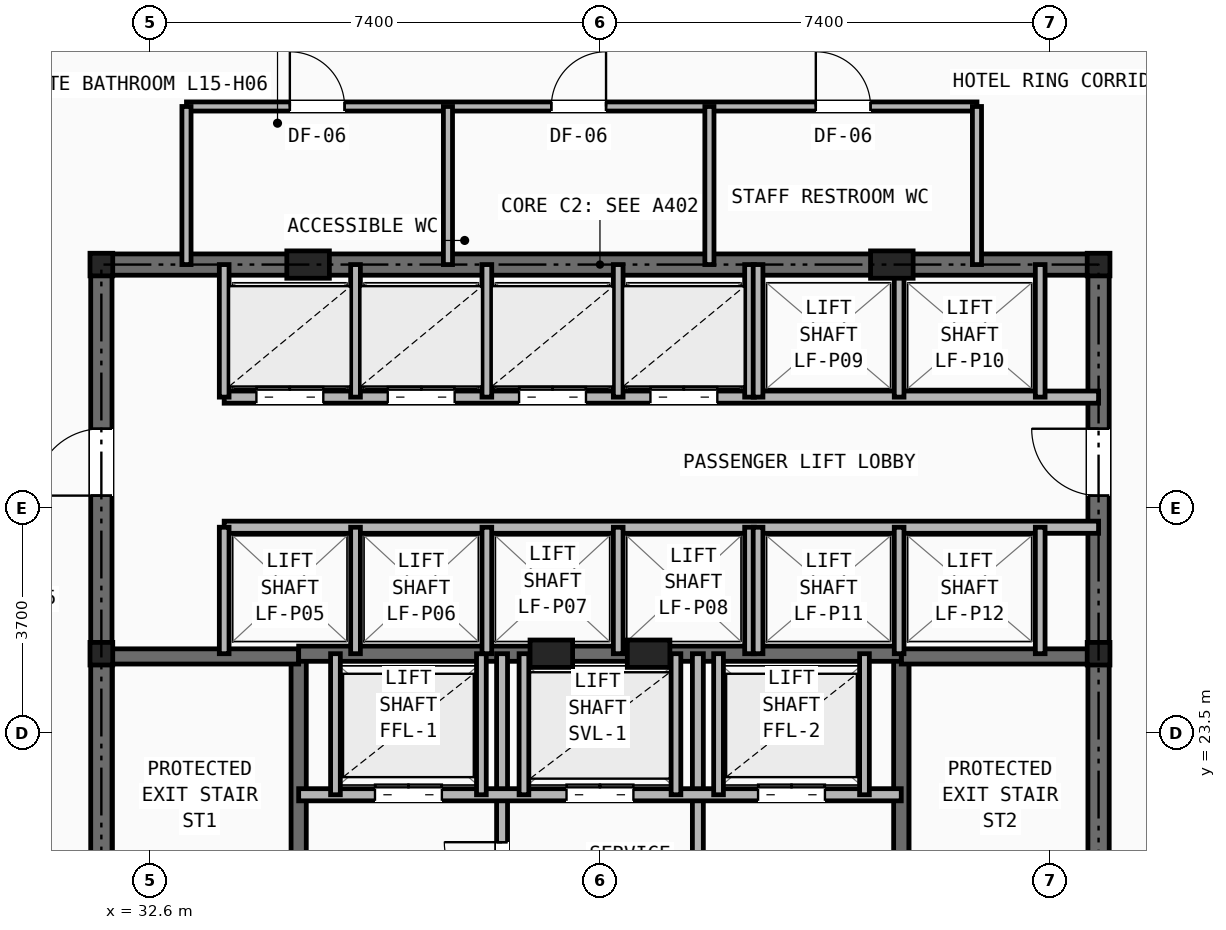
"""IFC4 building model, lengths in metres.
Left out: names, types, materials, properties, quantities, classifications, styles, units other than length and angle.
Written with IfcOpenShell. Run it as: python <this file> out.ifc"""

import sys

from ifc_helpers import new_model, si_unit, direction, frame, frame_2d, origin, origin_2d, place, context, subcontext, project, spatial, rectangle, i_section, extrude, element, fill, save


model = new_model("IFC4")
c1 = context("Model", 3, precision=1e-05, world=origin(), true_north=direction((0.0, 1.0)))
c2 = subcontext(c1, "Body", "Model", "MODEL_VIEW")
j1 = project(units=[si_unit("LENGTHUNIT", "METRE"), si_unit("PLANEANGLEUNIT", "RADIAN")], contexts=[c1])
p1 = place(None, origin())
s1 = spatial("IfcSite", under=j1, at=p1, CompositionType="ELEMENT")
p2 = place(p1, origin())
s2 = spatial("IfcBuilding", under=s1, at=p2, CompositionType="ELEMENT")
p3 = place(p2, frame((0.0, 0.0, 56.0)))
s3 = spatial("IfcBuildingStorey", under=s2, at=p3, CompositionType="ELEMENT", Elevation=56.0)
for number, where, z_axis, x_axis in (
    (1, (31.8, 24.8, 0.0), (0.0, 0.0, 1.0), (1.0, 0.0, 0.0)),
    (2, (48.2, 24.8, 0.0), (0.0, 0.0, 1.0), (1.0, 0.0, 0.0)),
    (3, (31.8, 31.2, 0.0), (0.0, 0.0, 1.0), (1.0, 0.0, 0.0)),
    (4, (48.2, 31.2, 0.0), (0.0, 0.0, 1.0), (1.0, 0.0, 0.0)),
):
    element("IfcColumn", number, at=place(p3, frame(where, z_axis=z_axis, x_axis=x_axis)), inside=s3, PredefinedType="COLUMN", context=c2, shape_type="SweptSolid", body=[
        extrude(i_section(OverallWidth=0.374, OverallDepth=0.372, WebThickness=0.016, FlangeThickness=0.026, at=origin_2d()), origin(), (0.0, 0.0, 1.0), 3.2),
    ])
for number, where, z_axis, x_axis in (
    (5, (35.2, 31.2, 0.0), (0.0, 0.0, 1.0), (1.0, 0.0, 0.0)),
    (6, (44.8, 31.2, 0.0), (0.0, 0.0, 1.0), (1.0, 0.0, 0.0)),
    (7, (39.2, 24.8, 0.0), (0.0, 0.0, 1.0), (1.0, 0.0, 0.0)),
    (8, (40.8, 24.8, 0.0), (0.0, 0.0, 1.0), (1.0, 0.0, 0.0)),
):
    element("IfcColumn", number, at=place(p3, frame(where, z_axis=z_axis, x_axis=x_axis)), inside=s3, PredefinedType="PILASTER", context=c2, shape_type="SweptSolid", body=[
        extrude(rectangle(XDim=0.7, YDim=0.45, at=origin_2d()), origin(), (0.0, 0.0, 1.0), 3.2),
    ])
p4 = place(p3, frame((31.8, 31.2, 0.0), z_axis=(0.0, 0.0, 1.0), x_axis=(1.0, 0.0, 0.0)))
e9 = element("IfcWall", 9, at=p4, inside=s3, PredefinedType="SHEAR", context=c2, shape_type="SweptSolid", body=[
    extrude(rectangle(XDim=16.4, YDim=0.35, at=frame_2d((8.2, 0.0))), origin(), (0.0, 0.0, 1.0), 2.98),
])
p5 = place(p3, frame((31.8, 16.4, 0.0), z_axis=(0.0, 0.0, 1.0), x_axis=(0.0, 1.0, 0.0)))
e10 = element("IfcWall", 10, at=p5, inside=s3, PredefinedType="SHEAR", context=c2, shape_type="SweptSolid", body=[
    extrude(rectangle(XDim=14.8, YDim=0.35, at=frame_2d((7.4, 0.0))), origin(), (0.0, 0.0, 1.0), 2.98),
])
p6 = place(p5, frame((11.0, 0.0, 0.0)))
e11 = element("IfcOpeningElement", 11, at=p6, cuts=e10, PredefinedType="OPENING", context=c2, shape_type="SweptSolid", body=[
    extrude(rectangle(XDim=1.1, YDim=2.15, at=frame_2d((0.55, 1.075))), frame((0.0, 0.185, 0.0), z_axis=(0.0, -1.0, 0.0), x_axis=(1.0, 0.0, 0.0)), (0.0, 0.0, 1.0), 0.37),
])
p7 = place(p3, frame((48.2, 16.4, 0.0), z_axis=(0.0, 0.0, 1.0), x_axis=(0.0, 1.0, 0.0)))
e12 = element("IfcWall", 12, at=p7, inside=s3, PredefinedType="SHEAR", context=c2, shape_type="SweptSolid", body=[
    extrude(rectangle(XDim=14.8, YDim=0.35, at=frame_2d((7.4, 0.0))), origin(), (0.0, 0.0, 1.0), 2.98),
])
p8 = place(p7, frame((11.0, 0.0, 0.0)))
e13 = element("IfcOpeningElement", 13, at=p8, cuts=e12, PredefinedType="OPENING", context=c2, shape_type="SweptSolid", body=[
    extrude(rectangle(XDim=1.1, YDim=2.15, at=frame_2d((0.55, 1.075))), frame((0.0, 0.185, 0.0), z_axis=(0.0, -1.0, 0.0), x_axis=(1.0, 0.0, 0.0)), (0.0, 0.0, 1.0), 0.37),
])
p9 = place(p3, frame((35.045, 16.4, 0.0), z_axis=(0.0, 0.0, 1.0), x_axis=(0.0, 1.0, 0.0)))
e14 = element("IfcWall", 14, at=p9, inside=s3, PredefinedType="SHEAR", context=c2, shape_type="SweptSolid", body=[
    extrude(rectangle(XDim=8.4, YDim=0.25, at=frame_2d((4.2, 0.0))), origin(), (0.0, 0.0, 1.0), 2.98),
])
p10 = place(p9, frame((0.45, 0.0, 0.0)))
e15 = element("IfcOpeningElement", 15, at=p10, cuts=e14, PredefinedType="OPENING", context=c2, shape_type="SweptSolid", body=[
    extrude(rectangle(XDim=0.95, YDim=2.1, at=frame_2d((0.475, 1.05))), frame((0.0, 0.135, 0.0), z_axis=(0.0, -1.0, 0.0), x_axis=(1.0, 0.0, 0.0)), (0.0, 0.0, 1.0), 0.27),
])
p11 = place(p3, frame((31.8, 24.755, 0.0), z_axis=(0.0, 0.0, 1.0), x_axis=(1.0, 0.0, 0.0)))
e16 = element("IfcWall", 16, at=p11, inside=s3, PredefinedType="SHEAR", context=c2, shape_type="SweptSolid", body=[
    extrude(rectangle(XDim=3.245, YDim=0.25, at=frame_2d((1.623, 0.0))), origin(), (0.0, 0.0, 1.0), 2.98),
])
p12 = place(p3, frame((44.955, 16.4, 0.0), z_axis=(0.0, 0.0, 1.0), x_axis=(0.0, 1.0, 0.0)))
e17 = element("IfcWall", 17, at=p12, inside=s3, PredefinedType="SHEAR", context=c2, shape_type="SweptSolid", body=[
    extrude(rectangle(XDim=8.4, YDim=0.25, at=frame_2d((4.2, 0.0))), origin(), (0.0, 0.0, 1.0), 2.98),
])
p13 = place(p12, frame((0.45, 0.0, 0.0)))
e18 = element("IfcOpeningElement", 18, at=p13, cuts=e17, PredefinedType="OPENING", context=c2, shape_type="SweptSolid", body=[
    extrude(rectangle(XDim=0.95, YDim=2.1, at=frame_2d((0.475, 1.05))), frame((0.0, 0.135, 0.0), z_axis=(0.0, -1.0, 0.0), x_axis=(1.0, 0.0, 0.0)), (0.0, 0.0, 1.0), 0.27),
])
p14 = place(p3, frame((44.955, 24.755, 0.0), z_axis=(0.0, 0.0, 1.0), x_axis=(1.0, 0.0, 0.0)))
e19 = element("IfcWall", 19, at=p14, inside=s3, PredefinedType="SHEAR", context=c2, shape_type="SweptSolid", body=[
    extrude(rectangle(XDim=3.245, YDim=0.25, at=frame_2d((1.623, 0.0))), origin(), (0.0, 0.0, 1.0), 2.98),
])
p15 = place(p3, frame((35.045, 24.8, 0.0), z_axis=(0.0, 0.0, 1.0), x_axis=(1.0, 0.0, 0.0)))
e20 = element("IfcWall", 20, at=p15, inside=s3, PredefinedType="SHEAR", context=c2, shape_type="SweptSolid", body=[
    extrude(rectangle(XDim=9.91, YDim=0.25, at=frame_2d((4.955, 0.0))), origin(), (0.0, 0.0, 1.0), 2.98),
])
p16 = place(p3, frame((38.39, 16.4, 0.0), z_axis=(0.0, 0.0, 1.0), x_axis=(0.0, 1.0, 0.0)))
e21 = element("IfcWall", 21, at=p16, inside=s3, PredefinedType="PARTITIONING", context=c2, shape_type="SweptSolid", body=[
    extrude(rectangle(XDim=8.4, YDim=0.18, at=frame_2d((4.2, 0.0))), origin(), (0.0, 0.0, 1.0), 2.708),
])
p17 = place(p16, frame((1.8, 0.0, 0.0)))
e22 = element("IfcOpeningElement", 22, at=p17, cuts=e21, PredefinedType="OPENING", context=c2, shape_type="SweptSolid", body=[
    extrude(rectangle(XDim=0.85, YDim=2.05, at=frame_2d((0.425, 1.025))), frame((0.0, 0.1, 0.0), z_axis=(0.0, -1.0, 0.0), x_axis=(1.0, 0.0, 0.0)), (0.0, 0.0, 1.0), 0.2),
])
p18 = place(p16, frame((4.35, 0.0, 0.0)))
e23 = element("IfcOpeningElement", 23, at=p18, cuts=e21, PredefinedType="OPENING", context=c2, shape_type="SweptSolid", body=[
    extrude(rectangle(XDim=0.95, YDim=2.1, at=frame_2d((0.475, 1.05))), frame((0.0, 0.1, 0.0), z_axis=(0.0, -1.0, 0.0), x_axis=(1.0, 0.0, 0.0)), (0.0, 0.0, 1.0), 0.2),
])
p19 = place(p3, frame((41.61, 16.4, 0.0), z_axis=(0.0, 0.0, 1.0), x_axis=(0.0, 1.0, 0.0)))
e24 = element("IfcWall", 24, at=p19, inside=s3, PredefinedType="PARTITIONING", context=c2, shape_type="SweptSolid", body=[
    extrude(rectangle(XDim=8.4, YDim=0.18, at=frame_2d((4.2, 0.0))), origin(), (0.0, 0.0, 1.0), 2.708),
])
p20 = place(p19, frame((1.8, 0.0, 0.0)))
e25 = element("IfcOpeningElement", 25, at=p20, cuts=e24, PredefinedType="OPENING", context=c2, shape_type="SweptSolid", body=[
    extrude(rectangle(XDim=0.85, YDim=2.05, at=frame_2d((0.425, 1.025))), frame((0.0, 0.1, 0.0), z_axis=(0.0, -1.0, 0.0), x_axis=(1.0, 0.0, 0.0)), (0.0, 0.0, 1.0), 0.2),
])
p21 = place(p3, frame((35.045, 22.48, 0.0), z_axis=(0.0, 0.0, 1.0), x_axis=(1.0, 0.0, 0.0)))
e26 = element("IfcWall", 26, at=p21, inside=s3, PredefinedType="SOLIDWALL", context=c2, shape_type="SweptSolid", body=[
    extrude(rectangle(XDim=9.91, YDim=0.2, at=frame_2d((4.955, 0.0))), origin(), (0.0, 0.0, 1.0), 2.98),
])
p22 = place(p21, frame((1.255, 0.0, 0.0)))
e27 = element("IfcOpeningElement", 27, at=p22, cuts=e26, PredefinedType="OPENING", context=c2, shape_type="SweptSolid", body=[
    extrude(rectangle(XDim=1.1, YDim=2.15, at=frame_2d((0.55, 1.075))), frame((0.0, 0.11, 0.0), z_axis=(0.0, -1.0, 0.0), x_axis=(1.0, 0.0, 0.0)), (0.0, 0.0, 1.0), 0.22),
])
p23 = place(p21, frame((7.555, 0.0, 0.0)))
e28 = element("IfcOpeningElement", 28, at=p23, cuts=e26, PredefinedType="OPENING", context=c2, shape_type="SweptSolid", body=[
    extrude(rectangle(XDim=1.1, YDim=2.15, at=frame_2d((0.55, 1.075))), frame((0.0, 0.11, 0.0), z_axis=(0.0, -1.0, 0.0), x_axis=(1.0, 0.0, 0.0)), (0.0, 0.0, 1.0), 0.22),
])
p24 = place(p21, frame((4.405, 0.0, 0.0)))
e29 = element("IfcOpeningElement", 29, at=p24, cuts=e26, PredefinedType="OPENING", context=c2, shape_type="SweptSolid", body=[
    extrude(rectangle(XDim=1.1, YDim=2.15, at=frame_2d((0.55, 1.075))), frame((0.0, 0.11, 0.0), z_axis=(0.0, -1.0, 0.0), x_axis=(1.0, 0.0, 0.0)), (0.0, 0.0, 1.0), 0.22),
])
for number, where, z_axis, x_axis in (
    (30, (35.65, 22.48, 0.0), (0.0, 0.0, 1.0), (0.0, 1.0, 0.0)),
    (31, (38.05, 22.48, 0.0), (0.0, 0.0, 1.0), (0.0, 1.0, 0.0)),
    (32, (41.95, 22.48, 0.0), (0.0, 0.0, 1.0), (0.0, 1.0, 0.0)),
    (33, (44.35, 22.48, 0.0), (0.0, 0.0, 1.0), (0.0, 1.0, 0.0)),
    (34, (38.75, 22.48, 0.0), (0.0, 0.0, 1.0), (0.0, 1.0, 0.0)),
    (35, (41.25, 22.48, 0.0), (0.0, 0.0, 1.0), (0.0, 1.0, 0.0)),
):
    element("IfcWall", number, at=place(p3, frame(where, z_axis=z_axis, x_axis=x_axis)), inside=s3, PredefinedType="SOLIDWALL", context=c2, shape_type="SweptSolid", body=[
        extrude(rectangle(XDim=2.32, YDim=0.16, at=frame_2d((1.16, 0.0))), origin(), (0.0, 0.0, 1.0), 2.98),
    ])
p25 = place(p3, frame((33.82, 29.02, 0.0), z_axis=(0.0, 0.0, 1.0), x_axis=(1.0, 0.0, 0.0)))
e36 = element("IfcWall", 36, at=p25, inside=s3, PredefinedType="SOLIDWALL", context=c2, shape_type="SweptSolid", body=[
    extrude(rectangle(XDim=14.38, YDim=0.2, at=frame_2d((7.19, 0.0))), origin(), (0.0, 0.0, 1.0), 2.431),
])
p26 = place(p25, frame((0.53, 0.0, 0.0)))
e37 = element("IfcOpeningElement", 37, at=p26, cuts=e36, PredefinedType="OPENING", context=c2, shape_type="SweptSolid", body=[
    extrude(rectangle(XDim=1.1, YDim=2.15, at=frame_2d((0.55, 1.075))), frame((0.0, 0.11, 0.0), z_axis=(0.0, -1.0, 0.0), x_axis=(1.0, 0.0, 0.0)), (0.0, 0.0, 1.0), 0.22),
])
p27 = place(p25, frame((2.69, 0.0, 0.0)))
e38 = element("IfcOpeningElement", 38, at=p27, cuts=e36, PredefinedType="OPENING", context=c2, shape_type="SweptSolid", body=[
    extrude(rectangle(XDim=1.1, YDim=2.15, at=frame_2d((0.55, 1.075))), frame((0.0, 0.11, 0.0), z_axis=(0.0, -1.0, 0.0), x_axis=(1.0, 0.0, 0.0)), (0.0, 0.0, 1.0), 0.22),
])
p28 = place(p25, frame((4.85, 0.0, 0.0)))
e39 = element("IfcOpeningElement", 39, at=p28, cuts=e36, PredefinedType="OPENING", context=c2, shape_type="SweptSolid", body=[
    extrude(rectangle(XDim=1.1, YDim=2.15, at=frame_2d((0.55, 1.075))), frame((0.0, 0.11, 0.0), z_axis=(0.0, -1.0, 0.0), x_axis=(1.0, 0.0, 0.0)), (0.0, 0.0, 1.0), 0.22),
])
p29 = place(p25, frame((7.01, 0.0, 0.0)))
e40 = element("IfcOpeningElement", 40, at=p29, cuts=e36, PredefinedType="OPENING", context=c2, shape_type="SweptSolid", body=[
    extrude(rectangle(XDim=1.1, YDim=2.15, at=frame_2d((0.55, 1.075))), frame((0.0, 0.11, 0.0), z_axis=(0.0, -1.0, 0.0), x_axis=(1.0, 0.0, 0.0)), (0.0, 0.0, 1.0), 0.22),
])
p30 = place(p3, frame((33.82, 26.88, 0.0), z_axis=(0.0, 0.0, 1.0), x_axis=(1.0, 0.0, 0.0)))
e41 = element("IfcWall", 41, at=p30, inside=s3, PredefinedType="SOLIDWALL", context=c2, shape_type="SweptSolid", body=[
    extrude(rectangle(XDim=14.38, YDim=0.2, at=frame_2d((7.19, 0.0))), origin(), (0.0, 0.0, 1.0), 2.431),
])
p31 = place(p3, frame((33.82, 29.02, 0.0), z_axis=(0.0, 0.0, 1.0), x_axis=(0.0, 1.0, 0.0)))
e42 = element("IfcWall", 42, at=p31, inside=s3, PredefinedType="SOLIDWALL", context=c2, shape_type="SweptSolid", body=[
    extrude(rectangle(XDim=2.18, YDim=0.16, at=frame_2d((1.09, 0.0))), origin(), (0.0, 0.0, 1.0), 2.708),
])
p32 = place(p3, frame((33.82, 24.8, 0.0), z_axis=(0.0, 0.0, 1.0), x_axis=(0.0, 1.0, 0.0)))
e43 = element("IfcWall", 43, at=p32, inside=s3, PredefinedType="SOLIDWALL", context=c2, shape_type="SweptSolid", body=[
    extrude(rectangle(XDim=2.08, YDim=0.16, at=frame_2d((1.04, 0.0))), origin(), (0.0, 0.0, 1.0), 2.98),
])
for number, where, z_axis, x_axis in (
    (44, (35.98, 29.02, 0.0), (0.0, 0.0, 1.0), (0.0, 1.0, 0.0)),
    (45, (38.14, 29.02, 0.0), (0.0, 0.0, 1.0), (0.0, 1.0, 0.0)),
    (46, (40.3, 29.02, 0.0), (0.0, 0.0, 1.0), (0.0, 1.0, 0.0)),
    (47, (42.46, 29.02, 0.0), (0.0, 0.0, 1.0), (0.0, 1.0, 0.0)),
):
    element("IfcWall", number, at=place(p3, frame(where, z_axis=z_axis, x_axis=x_axis)), inside=s3, PredefinedType="SOLIDWALL", context=c2, shape_type="SweptSolid", body=[
        extrude(rectangle(XDim=2.18, YDim=0.16, at=frame_2d((1.09, 0.0))), origin(), (0.0, 0.0, 1.0), 2.708),
    ])
for number, where, z_axis, x_axis in (
    (48, (35.98, 24.8, 0.0), (0.0, 0.0, 1.0), (0.0, 1.0, 0.0)),
    (49, (38.14, 24.8, 0.0), (0.0, 0.0, 1.0), (0.0, 1.0, 0.0)),
    (50, (40.3, 24.8, 0.0), (0.0, 0.0, 1.0), (0.0, 1.0, 0.0)),
    (51, (42.46, 24.8, 0.0), (0.0, 0.0, 1.0), (0.0, 1.0, 0.0)),
):
    element("IfcWall", number, at=place(p3, frame(where, z_axis=z_axis, x_axis=x_axis)), inside=s3, PredefinedType="SOLIDWALL", context=c2, shape_type="SweptSolid", body=[
        extrude(rectangle(XDim=2.08, YDim=0.16, at=frame_2d((1.04, 0.0))), origin(), (0.0, 0.0, 1.0), 2.98),
    ])
for number, where, z_axis, x_axis in (
    (52, (42.6, 29.02, 0.0), (0.0, 0.0, 1.0), (0.0, 1.0, 0.0)),
    (53, (44.92, 29.02, 0.0), (0.0, 0.0, 1.0), (0.0, 1.0, 0.0)),
    (54, (47.24, 29.02, 0.0), (0.0, 0.0, 1.0), (0.0, 1.0, 0.0)),
):
    element("IfcWall", number, at=place(p3, frame(where, z_axis=z_axis, x_axis=x_axis)), inside=s3, PredefinedType="SOLIDWALL", context=c2, shape_type="SweptSolid", body=[
        extrude(rectangle(XDim=2.18, YDim=0.16, at=frame_2d((1.09, 0.0))), origin(), (0.0, 0.0, 1.0), 2.708),
    ])
for number, where, z_axis, x_axis in (
    (55, (42.6, 24.8, 0.0), (0.0, 0.0, 1.0), (0.0, 1.0, 0.0)),
    (56, (44.92, 24.8, 0.0), (0.0, 0.0, 1.0), (0.0, 1.0, 0.0)),
    (57, (47.24, 24.8, 0.0), (0.0, 0.0, 1.0), (0.0, 1.0, 0.0)),
):
    element("IfcWall", number, at=place(p3, frame(where, z_axis=z_axis, x_axis=x_axis)), inside=s3, PredefinedType="SOLIDWALL", context=c2, shape_type="SweptSolid", body=[
        extrude(rectangle(XDim=2.08, YDim=0.16, at=frame_2d((1.04, 0.0))), origin(), (0.0, 0.0, 1.0), 2.98),
    ])
p33 = place(p3, frame((33.2, 33.8, 0.0), z_axis=(0.0, 0.0, 1.0), x_axis=(1.0, 0.0, 0.0)))
e58 = element("IfcWall", 58, at=p33, inside=s3, PredefinedType="PARTITIONING", context=c2, shape_type="SweptSolid", body=[
    extrude(rectangle(XDim=13.0, YDim=0.15, at=frame_2d((6.5, 0.0))), origin(), (0.0, 0.0, 1.0), 2.98),
])
p34 = place(p33, frame((1.7, 0.0, 0.0)))
e59 = element("IfcOpeningElement", 59, at=p34, cuts=e58, PredefinedType="OPENING", context=c2, shape_type="SweptSolid", body=[
    extrude(rectangle(XDim=0.9, YDim=2.1, at=frame_2d((0.45, 1.05))), frame((0.0, 0.085, 0.0), z_axis=(0.0, -1.0, 0.0), x_axis=(1.0, 0.0, 0.0)), (0.0, 0.0, 1.0), 0.17),
])
p35 = place(p33, frame((6.0, 0.0, 0.0)))
e60 = element("IfcOpeningElement", 60, at=p35, cuts=e58, PredefinedType="OPENING", context=c2, shape_type="SweptSolid", body=[
    extrude(rectangle(XDim=0.9, YDim=2.1, at=frame_2d((0.45, 1.05))), frame((0.0, 0.085, 0.0), z_axis=(0.0, -1.0, 0.0), x_axis=(1.0, 0.0, 0.0)), (0.0, 0.0, 1.0), 0.17),
])
p36 = place(p33, frame((10.35, 0.0, 0.0)))
e61 = element("IfcOpeningElement", 61, at=p36, cuts=e58, PredefinedType="OPENING", context=c2, shape_type="SweptSolid", body=[
    extrude(rectangle(XDim=0.9, YDim=2.1, at=frame_2d((0.45, 1.05))), frame((0.0, 0.085, 0.0), z_axis=(0.0, -1.0, 0.0), x_axis=(1.0, 0.0, 0.0)), (0.0, 0.0, 1.0), 0.17),
])
for number, where, z_axis, x_axis in (
    (62, (33.2, 31.2, 0.0), (0.0, 0.0, 1.0), (0.0, 1.0, 0.0)),
    (63, (46.2, 31.2, 0.0), (0.0, 0.0, 1.0), (0.0, 1.0, 0.0)),
    (64, (37.5, 31.2, 0.0), (0.0, 0.0, 1.0), (0.0, 1.0, 0.0)),
    (65, (41.8, 31.2, 0.0), (0.0, 0.0, 1.0), (0.0, 1.0, 0.0)),
):
    element("IfcWall", number, at=place(p3, frame(where, z_axis=z_axis, x_axis=x_axis)), inside=s3, PredefinedType="PARTITIONING", context=c2, shape_type="SweptSolid", body=[
        extrude(rectangle(XDim=2.6, YDim=0.15, at=frame_2d((1.3, 0.0))), origin(), (0.0, 0.0, 1.0), 2.708),
    ])
p37 = place(p18, origin())
e66 = element("IfcDoor", 66, at=p37, inside=s3, OperationType="SINGLE_SWING_RIGHT", PredefinedType="DOOR", context=c2, shape_type="SweptSolid", body=[
    extrude(rectangle(XDim=0.95, YDim=2.1, at=frame_2d((0.475, 1.05))), frame((0.0, 0.025, 0.0), z_axis=(0.0, -1.0, 0.0), x_axis=(1.0, 0.0, 0.0)), (0.0, 0.0, 1.0), 0.05),
])
fill(e23, e66)
p38 = place(p22, origin())
e67 = element("IfcDoor", 67, at=p38, inside=s3, OperationType="DOUBLE_DOOR_SLIDING", PredefinedType="DOOR", context=c2, shape_type="SweptSolid", body=[
    extrude(rectangle(XDim=1.1, YDim=2.15, at=frame_2d((0.55, 1.075))), frame((0.0, 0.025, 0.0), z_axis=(0.0, -1.0, 0.0), x_axis=(1.0, 0.0, 0.0)), (0.0, 0.0, 1.0), 0.05),
])
fill(e27, e67)
p39 = place(p23, origin())
e68 = element("IfcDoor", 68, at=p39, inside=s3, OperationType="DOUBLE_DOOR_SLIDING", PredefinedType="DOOR", context=c2, shape_type="SweptSolid", body=[
    extrude(rectangle(XDim=1.1, YDim=2.15, at=frame_2d((0.55, 1.075))), frame((0.0, 0.025, 0.0), z_axis=(0.0, -1.0, 0.0), x_axis=(1.0, 0.0, 0.0)), (0.0, 0.0, 1.0), 0.05),
])
fill(e28, e68)
p40 = place(p24, origin())
e69 = element("IfcDoor", 69, at=p40, inside=s3, OperationType="DOUBLE_DOOR_SLIDING", PredefinedType="DOOR", context=c2, shape_type="SweptSolid", body=[
    extrude(rectangle(XDim=1.1, YDim=2.15, at=frame_2d((0.55, 1.075))), frame((0.0, 0.025, 0.0), z_axis=(0.0, -1.0, 0.0), x_axis=(1.0, 0.0, 0.0)), (0.0, 0.0, 1.0), 0.05),
])
fill(e29, e69)
p41 = place(p6, origin())
e70 = element("IfcDoor", 70, at=p41, inside=s3, OperationType="SINGLE_SWING_LEFT", PredefinedType="DOOR", context=c2, shape_type="SweptSolid", body=[
    extrude(rectangle(XDim=1.1, YDim=2.15, at=frame_2d((0.55, 1.075))), frame((0.0, 0.025, 0.0), z_axis=(0.0, -1.0, 0.0), x_axis=(1.0, 0.0, 0.0)), (0.0, 0.0, 1.0), 0.05),
])
fill(e11, e70)
p42 = place(p8, origin())
e71 = element("IfcDoor", 71, at=p42, inside=s3, OperationType="SINGLE_SWING_RIGHT", PredefinedType="DOOR", context=c2, shape_type="SweptSolid", body=[
    extrude(rectangle(XDim=1.1, YDim=2.15, at=frame_2d((0.55, 1.075))), frame((0.0, 0.025, 0.0), z_axis=(0.0, -1.0, 0.0), x_axis=(1.0, 0.0, 0.0)), (0.0, 0.0, 1.0), 0.05),
])
fill(e13, e71)
p43 = place(p26, origin())
e72 = element("IfcDoor", 72, at=p43, inside=s3, OperationType="DOUBLE_DOOR_SLIDING", PredefinedType="DOOR", context=c2, shape_type="SweptSolid", body=[
    extrude(rectangle(XDim=1.1, YDim=2.15, at=frame_2d((0.55, 1.075))), frame((0.0, 0.025, 0.0), z_axis=(0.0, -1.0, 0.0), x_axis=(1.0, 0.0, 0.0)), (0.0, 0.0, 1.0), 0.05),
])
fill(e37, e72)
p44 = place(p27, origin())
e73 = element("IfcDoor", 73, at=p44, inside=s3, OperationType="DOUBLE_DOOR_SLIDING", PredefinedType="DOOR", context=c2, shape_type="SweptSolid", body=[
    extrude(rectangle(XDim=1.1, YDim=2.15, at=frame_2d((0.55, 1.075))), frame((0.0, 0.025, 0.0), z_axis=(0.0, -1.0, 0.0), x_axis=(1.0, 0.0, 0.0)), (0.0, 0.0, 1.0), 0.05),
])
fill(e38, e73)
p45 = place(p28, origin())
e74 = element("IfcDoor", 74, at=p45, inside=s3, OperationType="DOUBLE_DOOR_SLIDING", PredefinedType="DOOR", context=c2, shape_type="SweptSolid", body=[
    extrude(rectangle(XDim=1.1, YDim=2.15, at=frame_2d((0.55, 1.075))), frame((0.0, 0.025, 0.0), z_axis=(0.0, -1.0, 0.0), x_axis=(1.0, 0.0, 0.0)), (0.0, 0.0, 1.0), 0.05),
])
fill(e39, e74)
p46 = place(p29, origin())
e75 = element("IfcDoor", 75, at=p46, inside=s3, OperationType="DOUBLE_DOOR_SLIDING", PredefinedType="DOOR", context=c2, shape_type="SweptSolid", body=[
    extrude(rectangle(XDim=1.1, YDim=2.15, at=frame_2d((0.55, 1.075))), frame((0.0, 0.025, 0.0), z_axis=(0.0, -1.0, 0.0), x_axis=(1.0, 0.0, 0.0)), (0.0, 0.0, 1.0), 0.05),
])
fill(e40, e75)
p47 = place(p34, origin())
e76 = element("IfcDoor", 76, at=p47, inside=s3, OperationType="SINGLE_SWING_LEFT", PredefinedType="DOOR", context=c2, shape_type="SweptSolid", body=[
    extrude(rectangle(XDim=0.9, YDim=2.1, at=frame_2d((0.45, 1.05))), frame((0.0, 0.025, 0.0), z_axis=(0.0, -1.0, 0.0), x_axis=(1.0, 0.0, 0.0)), (0.0, 0.0, 1.0), 0.05),
])
fill(e59, e76)
p48 = place(p35, origin())
e77 = element("IfcDoor", 77, at=p48, inside=s3, OperationType="SINGLE_SWING_RIGHT", PredefinedType="DOOR", context=c2, shape_type="SweptSolid", body=[
    extrude(rectangle(XDim=0.9, YDim=2.1, at=frame_2d((0.45, 1.05))), frame((0.0, 0.025, 0.0), z_axis=(0.0, -1.0, 0.0), x_axis=(1.0, 0.0, 0.0)), (0.0, 0.0, 1.0), 0.05),
])
fill(e60, e77)
p49 = place(p36, origin())
e78 = element("IfcDoor", 78, at=p49, inside=s3, OperationType="SINGLE_SWING_LEFT", PredefinedType="DOOR", context=c2, shape_type="SweptSolid", body=[
    extrude(rectangle(XDim=0.9, YDim=2.1, at=frame_2d((0.45, 1.05))), frame((0.0, 0.025, 0.0), z_axis=(0.0, -1.0, 0.0), x_axis=(1.0, 0.0, 0.0)), (0.0, 0.0, 1.0), 0.05),
])
fill(e61, e78)
save(model, sys.argv[1])
